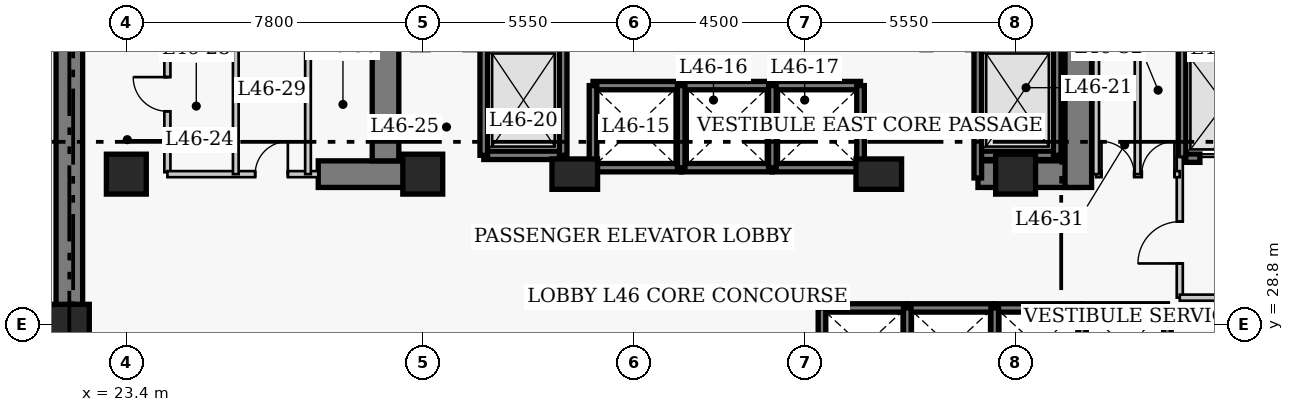
"""IFC4 building model, lengths in metres.
Left out: names, types, materials, properties, quantities, classifications, styles, units other than length and angle.
Written with IfcOpenShell. Run it as: python <this file> out.ifc"""

import sys

from ifc_helpers import new_model, si_unit, direction, frame, frame_2d, origin, origin_2d, place, context, subcontext, project, spatial, rectangle, extrude, element, fill, save


model = new_model("IFC4")
c1 = context("Model", 3, precision=1e-05, world=origin(), true_north=direction((0.0, 1.0)))
c2 = subcontext(c1, "Body", "Model", "MODEL_VIEW")
j1 = project(units=[si_unit("LENGTHUNIT", "METRE"), si_unit("PLANEANGLEUNIT", "RADIAN")], contexts=[c1])
p1 = place(None, origin())
s1 = spatial("IfcSite", under=j1, at=p1, CompositionType="ELEMENT")
p2 = place(p1, origin())
s2 = spatial("IfcBuilding", under=s1, at=p2, CompositionType="ELEMENT")
p3 = place(p2, frame((0.0, 0.0, 184.0)))
s3 = spatial("IfcBuildingStorey", under=s2, at=p3, CompositionType="ELEMENT", Elevation=184.0)
p4 = place(p3, frame((21.9, 27.05, 0.0), z_axis=(0.0, 0.0, 1.0), x_axis=(0.0, 1.0, 0.0)))
e1 = element("IfcWall", 1, at=p4, inside=s3, PredefinedType="SHEAR", context=c2, shape_type="SweptSolid", body=[
    extrude(rectangle(XDim=13.62, YDim=0.7, at=frame_2d((6.81, 0.0))), origin(), (0.0, 0.0, 1.0), 5.0),
])
p5 = place(p3, frame((28.45, 32.75, 0.0), z_axis=(0.0, 0.0, 1.0), x_axis=(1.0, 0.0, 0.0)))
e2 = element("IfcWall", 2, at=p5, inside=s3, PredefinedType="SHEAR", context=c2, shape_type="SweptSolid", body=[
    extrude(rectangle(XDim=2.4, YDim=0.7, at=frame_2d((1.2, 0.0))), origin(), (0.0, 0.0, 1.0), 5.0),
])
p6 = place(p3, frame((45.81, 32.75, 0.0), z_axis=(0.0, 0.0, 1.0), x_axis=(1.0, 0.0, 0.0)))
e3 = element("IfcWall", 3, at=p6, inside=s3, PredefinedType="SHEAR", context=c2, shape_type="SweptSolid", body=[
    extrude(rectangle(XDim=2.64, YDim=0.7, at=frame_2d((1.32, 0.0))), origin(), (0.0, 0.0, 1.0), 5.0),
])
p7 = place(p3, frame((30.22, 33.1, 0.0), z_axis=(0.0, 0.0, 1.0), x_axis=(0.0, 1.0, 0.0)))
e4 = element("IfcWall", 4, at=p7, inside=s3, PredefinedType="SHEAR", context=c2, shape_type="SweptSolid", body=[
    extrude(rectangle(XDim=7.22, YDim=0.7, at=frame_2d((3.61, 0.0))), origin(), (0.0, 0.0, 1.0), 5.0),
])
p8 = place(p3, frame((48.45, 32.4, 0.0), z_axis=(0.0, 0.0, 1.0), x_axis=(0.0, 1.0, 0.0)))
e5 = element("IfcWall", 5, at=p8, inside=s3, PredefinedType="SHEAR", context=c2, shape_type="SweptSolid", body=[
    extrude(rectangle(XDim=7.92, YDim=0.7, at=frame_2d((3.96, 0.0))), origin(), (0.0, 0.0, 1.0), 5.0),
])
p9 = place(p8, frame((5.8, 0.0, 0.0)))
e6 = element("IfcOpeningElement", 6, at=p9, cuts=e5, PredefinedType="OPENING", context=c2, shape_type="SweptSolid", body=[
    extrude(rectangle(XDim=1.1, YDim=2.15, at=frame_2d((0.55, 1.075))), frame((0.0, 0.36, 0.0), z_axis=(0.0, -1.0, 0.0), x_axis=(1.0, 0.0, 0.0)), (0.0, 0.0, 1.0), 0.72),
])
for number, where, z_axis, x_axis in (
    (7, (21.9, 28.8, 0.0), (0.0, 0.0, 1.0), (1.0, 0.0, 0.0)),
    (8, (23.4, 32.75, 0.0), (0.0, 0.0, 1.0), (1.0, 0.0, 0.0)),
    (9, (31.2, 32.75, 0.0), (0.0, 0.0, 1.0), (1.0, 0.0, 0.0)),
):
    element("IfcColumn", number, at=place(p3, frame(where, z_axis=z_axis, x_axis=x_axis)), inside=s3, PredefinedType="COLUMN", context=c2, shape_type="SweptSolid", body=[
        extrude(rectangle(XDim=1.05, YDim=1.05, at=origin_2d()), origin(), (0.0, 0.0, 1.0), 5.0),
    ])
for number, where, z_axis, x_axis in (
    (10, (35.2, 32.75, 0.0), (0.0, 0.0, 1.0), (1.0, 0.0, 0.0)),
    (11, (43.2, 32.75, 0.0), (0.0, 0.0, 1.0), (1.0, 0.0, 0.0)),
):
    element("IfcColumn", number, at=place(p3, frame(where, z_axis=z_axis, x_axis=x_axis)), inside=s3, PredefinedType="COLUMN", context=c2, shape_type="SweptSolid", body=[
        extrude(rectangle(XDim=1.2, YDim=0.8, at=origin_2d()), origin(), (0.0, 0.0, 1.0), 5.0),
    ])
p10 = place(p3, frame((46.8, 32.75, 0.0), z_axis=(0.0, 0.0, 1.0), x_axis=(1.0, 0.0, 0.0)))
e12 = element("IfcColumn", 12, at=p10, inside=s3, PredefinedType="COLUMN", context=c2, shape_type="SweptSolid", body=[
    extrude(rectangle(XDim=1.05, YDim=1.05, at=origin_2d()), origin(), (0.0, 0.0, 1.0), 5.0),
])
p11 = place(p3, frame((41.705, 29.23, 0.0), z_axis=(0.0, 0.0, 1.0), x_axis=(1.0, 0.0, 0.0)))
e13 = element("IfcWall", 13, at=p11, inside=s3, PredefinedType="SHEAR", context=c2, shape_type="SweptSolid", body=[
    extrude(rectangle(XDim=2.245, YDim=0.22, at=frame_2d((1.123, 0.0))), origin(), (0.0, 0.0, 1.0), 5.0),
])
p12 = place(p3, frame((41.705, 27.17, 0.0), z_axis=(0.0, 0.0, 1.0), x_axis=(0.0, 1.0, 0.0)))
e14 = element("IfcWall", 14, at=p12, inside=s3, PredefinedType="SHEAR", context=c2, shape_type="SweptSolid", body=[
    extrude(rectangle(XDim=2.06, YDim=0.2, at=frame_2d((1.03, 0.0))), origin(), (0.0, 0.0, 1.0), 5.0),
])
p13 = place(p3, frame((43.95, 29.23, 0.0), z_axis=(0.0, 0.0, 1.0), x_axis=(1.0, 0.0, 0.0)))
e15 = element("IfcWall", 15, at=p13, inside=s3, PredefinedType="SHEAR", context=c2, shape_type="SweptSolid", body=[
    extrude(rectangle(XDim=2.3, YDim=0.22, at=frame_2d((1.15, 0.0))), origin(), (0.0, 0.0, 1.0), 5.0),
])
p14 = place(p3, frame((43.95, 27.17, 0.0), z_axis=(0.0, 0.0, 1.0), x_axis=(0.0, 1.0, 0.0)))
e16 = element("IfcWall", 16, at=p14, inside=s3, PredefinedType="SHEAR", context=c2, shape_type="SweptSolid", body=[
    extrude(rectangle(XDim=2.06, YDim=0.2, at=frame_2d((1.03, 0.0))), origin(), (0.0, 0.0, 1.0), 5.0),
])
p15 = place(p3, frame((46.25, 29.23, 0.0), z_axis=(0.0, 0.0, 1.0), x_axis=(1.0, 0.0, 0.0)))
e17 = element("IfcWall", 17, at=p15, inside=s3, PredefinedType="SHEAR", context=c2, shape_type="SweptSolid", body=[
    extrude(rectangle(XDim=2.3, YDim=0.22, at=frame_2d((1.15, 0.0))), origin(), (0.0, 0.0, 1.0), 5.0),
])
p16 = place(p3, frame((46.25, 27.17, 0.0), z_axis=(0.0, 0.0, 1.0), x_axis=(0.0, 1.0, 0.0)))
e18 = element("IfcWall", 18, at=p16, inside=s3, PredefinedType="SHEAR", context=c2, shape_type="SweptSolid", body=[
    extrude(rectangle(XDim=2.06, YDim=0.2, at=frame_2d((1.03, 0.0))), origin(), (0.0, 0.0, 1.0), 5.0),
])
p17 = place(p3, frame((48.55, 29.23, 0.0), z_axis=(0.0, 0.0, 1.0), x_axis=(1.0, 0.0, 0.0)))
e19 = element("IfcWall", 19, at=p17, inside=s3, PredefinedType="SHEAR", context=c2, shape_type="SweptSolid", body=[
    extrude(rectangle(XDim=2.245, YDim=0.22, at=frame_2d((1.123, 0.0))), origin(), (0.0, 0.0, 1.0), 5.0),
])
for number, where, z_axis, x_axis in (
    (20, (48.55, 27.17, 0.0), (0.0, 0.0, 1.0), (0.0, 1.0, 0.0)),
    (21, (50.795, 27.17, 0.0), (0.0, 0.0, 1.0), (0.0, 1.0, 0.0)),
):
    element("IfcWall", number, at=place(p3, frame(where, z_axis=z_axis, x_axis=x_axis)), inside=s3, PredefinedType="SHEAR", context=c2, shape_type="SweptSolid", body=[
        extrude(rectangle(XDim=2.06, YDim=0.2, at=frame_2d((1.03, 0.0))), origin(), (0.0, 0.0, 1.0), 5.0),
    ])
for number, where, z_axis, x_axis in (
    (22, (35.68, 35.08, 0.0), (0.0, 0.0, 1.0), (1.0, 0.0, 0.0)),
    (23, (35.68, 32.92, 0.0), (0.0, 0.0, 1.0), (1.0, 0.0, 0.0)),
):
    element("IfcWall", number, at=place(p3, frame(where, z_axis=z_axis, x_axis=x_axis)), inside=s3, PredefinedType="SHEAR", context=c2, shape_type="SweptSolid", body=[
        extrude(rectangle(XDim=2.32, YDim=0.22, at=frame_2d((1.16, 0.0))), origin(), (0.0, 0.0, 1.0), 5.0),
    ])
p18 = place(p3, frame((35.68, 32.92, 0.0), z_axis=(0.0, 0.0, 1.0), x_axis=(0.0, 1.0, 0.0)))
e24 = element("IfcWall", 24, at=p18, inside=s3, PredefinedType="SHEAR", context=c2, shape_type="SweptSolid", body=[
    extrude(rectangle(XDim=2.16, YDim=0.2, at=frame_2d((1.08, 0.0))), origin(), (0.0, 0.0, 1.0), 5.0),
])
for number, where, z_axis, x_axis in (
    (25, (38.0, 35.08, 0.0), (0.0, 0.0, 1.0), (1.0, 0.0, 0.0)),
    (26, (38.0, 32.92, 0.0), (0.0, 0.0, 1.0), (1.0, 0.0, 0.0)),
):
    element("IfcWall", number, at=place(p3, frame(where, z_axis=z_axis, x_axis=x_axis)), inside=s3, PredefinedType="SHEAR", context=c2, shape_type="SweptSolid", body=[
        extrude(rectangle(XDim=2.4, YDim=0.22, at=frame_2d((1.2, 0.0))), origin(), (0.0, 0.0, 1.0), 5.0),
    ])
p19 = place(p3, frame((38.0, 32.92, 0.0), z_axis=(0.0, 0.0, 1.0), x_axis=(0.0, 1.0, 0.0)))
e27 = element("IfcWall", 27, at=p19, inside=s3, PredefinedType="SHEAR", context=c2, shape_type="SweptSolid", body=[
    extrude(rectangle(XDim=2.16, YDim=0.2, at=frame_2d((1.08, 0.0))), origin(), (0.0, 0.0, 1.0), 5.0),
])
for number, where, z_axis, x_axis in (
    (28, (40.4, 35.08, 0.0), (0.0, 0.0, 1.0), (1.0, 0.0, 0.0)),
    (29, (40.4, 32.92, 0.0), (0.0, 0.0, 1.0), (1.0, 0.0, 0.0)),
):
    element("IfcWall", number, at=place(p3, frame(where, z_axis=z_axis, x_axis=x_axis)), inside=s3, PredefinedType="SHEAR", context=c2, shape_type="SweptSolid", body=[
        extrude(rectangle(XDim=2.32, YDim=0.22, at=frame_2d((1.16, 0.0))), origin(), (0.0, 0.0, 1.0), 5.0),
    ])
for number, where, z_axis, x_axis in (
    (30, (40.4, 32.92, 0.0), (0.0, 0.0, 1.0), (0.0, 1.0, 0.0)),
    (31, (42.72, 32.92, 0.0), (0.0, 0.0, 1.0), (0.0, 1.0, 0.0)),
):
    element("IfcWall", number, at=place(p3, frame(where, z_axis=z_axis, x_axis=x_axis)), inside=s3, PredefinedType="SHEAR", context=c2, shape_type="SweptSolid", body=[
        extrude(rectangle(XDim=2.16, YDim=0.2, at=frame_2d((1.08, 0.0))), origin(), (0.0, 0.0, 1.0), 5.0),
    ])
p20 = place(p3, frame((51.18, 36.03, 0.0), z_axis=(0.0, 0.0, 1.0), x_axis=(1.0, 0.0, 0.0)))
e32 = element("IfcWall", 32, at=p20, inside=s3, PredefinedType="SHEAR", context=c2, shape_type="SweptSolid", body=[
    extrude(rectangle(XDim=2.42, YDim=0.22, at=frame_2d((1.21, 0.0))), origin(), (0.0, 0.0, 1.0), 5.0),
])
p21 = place(p3, frame((51.18, 33.17, 0.0), z_axis=(0.0, 0.0, 1.0), x_axis=(1.0, 0.0, 0.0)))
e33 = element("IfcWall", 33, at=p21, inside=s3, PredefinedType="SHEAR", context=c2, shape_type="SweptSolid", body=[
    extrude(rectangle(XDim=2.42, YDim=0.22, at=frame_2d((1.21, 0.0))), origin(), (0.0, 0.0, 1.0), 5.0),
])
p22 = place(p21, frame((0.47, 0.0, 0.0)))
e34 = element("IfcOpeningElement", 34, at=p22, cuts=e33, PredefinedType="OPENING", context=c2, shape_type="SweptSolid", body=[
    extrude(rectangle(XDim=1.3, YDim=2.15, at=frame_2d((0.65, 1.075))), frame((0.0, 0.12, 0.0), z_axis=(0.0, -1.0, 0.0), x_axis=(1.0, 0.0, 0.0)), (0.0, 0.0, 1.0), 0.24),
])
p23 = place(p3, frame((51.18, 33.17, 0.0), z_axis=(0.0, 0.0, 1.0), x_axis=(0.0, 1.0, 0.0)))
e35 = element("IfcWall", 35, at=p23, inside=s3, PredefinedType="SHEAR", context=c2, shape_type="SweptSolid", body=[
    extrude(rectangle(XDim=2.86, YDim=0.2, at=frame_2d((1.43, 0.0))), origin(), (0.0, 0.0, 1.0), 5.0),
])
p24 = place(p3, frame((32.805, 33.245, 0.0), z_axis=(0.0, 0.0, 1.0), x_axis=(1.0, 0.0, 0.0)))
e36 = element("IfcWall", 36, at=p24, inside=s3, PredefinedType="SHEAR", context=c2, shape_type="SweptSolid", body=[
    extrude(rectangle(XDim=2.09, YDim=0.22, at=frame_2d((1.045, 0.0))), origin(), (0.0, 0.0, 1.0), 5.0),
])
for number, where, z_axis, x_axis in (
    (37, (32.805, 33.245, 0.0), (0.0, 0.0, 1.0), (0.0, 1.0, 0.0)),
    (38, (34.895, 33.245, 0.0), (0.0, 0.0, 1.0), (0.0, 1.0, 0.0)),
):
    element("IfcWall", number, at=place(p3, frame(where, z_axis=z_axis, x_axis=x_axis)), inside=s3, PredefinedType="SHEAR", context=c2, shape_type="SweptSolid", body=[
        extrude(rectangle(XDim=2.91, YDim=0.2, at=frame_2d((1.455, 0.0))), origin(), (0.0, 0.0, 1.0), 5.0),
    ])
p25 = place(p3, frame((45.805, 33.245, 0.0), z_axis=(0.0, 0.0, 1.0), x_axis=(1.0, 0.0, 0.0)))
e39 = element("IfcWall", 39, at=p25, inside=s3, PredefinedType="SHEAR", context=c2, shape_type="SweptSolid", body=[
    extrude(rectangle(XDim=2.09, YDim=0.22, at=frame_2d((1.045, 0.0))), origin(), (0.0, 0.0, 1.0), 5.0),
])
p26 = place(p3, frame((45.805, 32.65, 0.0), z_axis=(0.0, 0.0, 1.0), x_axis=(0.0, 1.0, 0.0)))
e40 = element("IfcWall", 40, at=p26, inside=s3, PredefinedType="SHEAR", context=c2, shape_type="SweptSolid", body=[
    extrude(rectangle(XDim=3.505, YDim=0.2, at=frame_2d((1.752, 0.0))), origin(), (0.0, 0.0, 1.0), 5.0),
])
p27 = place(p3, frame((47.895, 33.245, 0.0), z_axis=(0.0, 0.0, 1.0), x_axis=(0.0, 1.0, 0.0)))
e41 = element("IfcWall", 41, at=p27, inside=s3, PredefinedType="SHEAR", context=c2, shape_type="SweptSolid", body=[
    extrude(rectangle(XDim=2.91, YDim=0.2, at=frame_2d((1.455, 0.0))), origin(), (0.0, 0.0, 1.0), 5.0),
])
p28 = place(p3, frame((24.48, 32.8, 0.0), z_axis=(0.0, 0.0, 1.0), x_axis=(0.0, 1.0, 0.0)))
e42 = element("IfcWall", 42, at=p28, inside=s3, PredefinedType="PARTITIONING", context=c2, shape_type="SweptSolid", body=[
    extrude(rectangle(XDim=3.57, YDim=0.16, at=frame_2d((1.785, 0.0))), origin(), (0.0, 0.0, 1.0), 4.75),
])
p29 = place(p28, frame((1.604, 0.0, 0.0)))
e43 = element("IfcOpeningElement", 43, at=p29, cuts=e42, PredefinedType="OPENING", context=c2, shape_type="SweptSolid", body=[
    extrude(rectangle(XDim=0.9, YDim=2.1, at=frame_2d((0.45, 1.05))), frame((0.0, 0.09, 0.0), z_axis=(0.0, -1.0, 0.0), x_axis=(1.0, 0.0, 0.0)), (0.0, 0.0, 1.0), 0.18),
])
p30 = place(p3, frame((51.12, 29.5, 0.0), z_axis=(0.0, 0.0, 1.0), x_axis=(0.0, 1.0, 0.0)))
e44 = element("IfcWall", 44, at=p30, inside=s3, PredefinedType="PARTITIONING", context=c2, shape_type="SweptSolid", body=[
    extrude(rectangle(XDim=3.7, YDim=0.16, at=frame_2d((1.85, 0.0))), origin(), (0.0, 0.0, 1.0), 4.75),
])
p31 = place(p30, frame((0.9, 0.0, 0.0)))
e45 = element("IfcOpeningElement", 45, at=p31, cuts=e44, PredefinedType="OPENING", context=c2, shape_type="SweptSolid", body=[
    extrude(rectangle(XDim=1.1, YDim=2.15, at=frame_2d((0.55, 1.075))), frame((0.0, 0.09, 0.0), z_axis=(0.0, -1.0, 0.0), x_axis=(1.0, 0.0, 0.0)), (0.0, 0.0, 1.0), 0.18),
])
p32 = place(p3, frame((51.12, 29.5, 0.0), z_axis=(0.0, 0.0, 1.0), x_axis=(1.0, 0.0, 0.0)))
e46 = element("IfcWall", 46, at=p32, inside=s3, PredefinedType="PARTITIONING", context=c2, shape_type="SweptSolid", body=[
    extrude(rectangle(XDim=5.63, YDim=0.16, at=frame_2d((2.815, 0.0))), origin(), (0.0, 0.0, 1.0), 4.75),
])
p33 = place(p3, frame((24.48, 32.75, 0.0), z_axis=(0.0, 0.0, 1.0), x_axis=(1.0, 0.0, 0.0)))
e47 = element("IfcWall", 47, at=p33, inside=s3, PredefinedType="PARTITIONING", context=c2, shape_type="SweptSolid", body=[
    extrude(rectangle(XDim=3.97, YDim=0.16, at=frame_2d((1.985, 0.0))), origin(), (0.0, 0.0, 1.0), 4.75),
])
p34 = place(p33, frame((2.31, 0.0, 0.0)))
e48 = element("IfcOpeningElement", 48, at=p34, cuts=e47, PredefinedType="OPENING", context=c2, shape_type="SweptSolid", body=[
    extrude(rectangle(XDim=0.86, YDim=2.05, at=frame_2d((0.43, 1.025))), frame((0.0, 0.09, 0.0), z_axis=(0.0, -1.0, 0.0), x_axis=(1.0, 0.0, 0.0)), (0.0, 0.0, 1.0), 0.18),
])
p35 = place(p3, frame((48.92, 32.75, 0.0), z_axis=(0.0, 0.0, 1.0), x_axis=(1.0, 0.0, 0.0)))
e49 = element("IfcWall", 49, at=p35, inside=s3, PredefinedType="PARTITIONING", context=c2, shape_type="SweptSolid", body=[
    extrude(rectangle(XDim=2.2, YDim=0.16, at=frame_2d((1.1, 0.0))), origin(), (0.0, 0.0, 1.0), 4.75),
])
p36 = place(p35, frame((0.14, 0.0, 0.0)))
e50 = element("IfcOpeningElement", 50, at=p36, cuts=e49, PredefinedType="OPENING", context=c2, shape_type="SweptSolid", body=[
    extrude(rectangle(XDim=0.86, YDim=2.05, at=frame_2d((0.43, 1.025))), frame((0.0, 0.09, 0.0), z_axis=(0.0, -1.0, 0.0), x_axis=(1.0, 0.0, 0.0)), (0.0, 0.0, 1.0), 0.18),
])
p37 = place(p35, frame((1.2, 0.0, 0.0)))
e51 = element("IfcOpeningElement", 51, at=p37, cuts=e49, PredefinedType="OPENING", context=c2, shape_type="SweptSolid", body=[
    extrude(rectangle(XDim=0.86, YDim=2.05, at=frame_2d((0.43, 1.025))), frame((0.0, 0.09, 0.0), z_axis=(0.0, -1.0, 0.0), x_axis=(1.0, 0.0, 0.0)), (0.0, 0.0, 1.0), 0.18),
])
for number, where, z_axis, x_axis in (
    (52, (48.92, 32.75, 0.0), (0.0, 0.0, 1.0), (0.0, 1.0, 0.0)),
    (53, (26.28, 32.75, 0.0), (0.0, 0.0, 1.0), (0.0, 1.0, 0.0)),
    (54, (28.18, 32.75, 0.0), (0.0, 0.0, 1.0), (0.0, 1.0, 0.0)),
    (55, (50.01, 32.75, 0.0), (0.0, 0.0, 1.0), (0.0, 1.0, 0.0)),
):
    element("IfcWall", number, at=place(p3, frame(where, z_axis=z_axis, x_axis=x_axis)), inside=s3, PredefinedType="PARTITIONING", context=c2, shape_type="SweptSolid", body=[
        extrude(rectangle(XDim=3.62, YDim=0.15, at=frame_2d((1.81, 0.0))), origin(), (0.0, 0.0, 1.0), 4.75),
    ])
p38 = place(p22, origin())
e56 = element("IfcDoor", 56, at=p38, inside=s3, OperationType="DOUBLE_DOOR_SLIDING", PredefinedType="DOOR", context=c2, shape_type="SweptSolid", body=[
    extrude(rectangle(XDim=1.3, YDim=2.15, at=frame_2d((0.65, 1.075))), frame((0.0, 0.025, 0.0), z_axis=(0.0, -1.0, 0.0), x_axis=(1.0, 0.0, 0.0)), (0.0, 0.0, 1.0), 0.05),
])
fill(e34, e56)
p39 = place(p31, origin())
e57 = element("IfcDoor", 57, at=p39, inside=s3, OperationType="SINGLE_SWING_LEFT", PredefinedType="DOOR", context=c2, shape_type="SweptSolid", body=[
    extrude(rectangle(XDim=1.1, YDim=2.15, at=frame_2d((0.55, 1.075))), frame((0.0, 0.025, 0.0), z_axis=(0.0, -1.0, 0.0), x_axis=(1.0, 0.0, 0.0)), (0.0, 0.0, 1.0), 0.05),
])
fill(e45, e57)
p40 = place(p29, origin())
e58 = element("IfcDoor", 58, at=p40, inside=s3, OperationType="SINGLE_SWING_RIGHT", PredefinedType="DOOR", context=c2, shape_type="SweptSolid", body=[
    extrude(rectangle(XDim=0.9, YDim=2.1, at=frame_2d((0.45, 1.05))), frame((0.0, 0.025, 0.0), z_axis=(0.0, -1.0, 0.0), x_axis=(1.0, 0.0, 0.0)), (0.0, 0.0, 1.0), 0.05),
])
fill(e43, e58)
p41 = place(p34, origin())
e59 = element("IfcDoor", 59, at=p41, inside=s3, OperationType="SINGLE_SWING_RIGHT", PredefinedType="DOOR", context=c2, shape_type="SweptSolid", body=[
    extrude(rectangle(XDim=0.86, YDim=2.05, at=frame_2d((0.43, 1.025))), frame((0.0, 0.025, 0.0), z_axis=(0.0, -1.0, 0.0), x_axis=(1.0, 0.0, 0.0)), (0.0, 0.0, 1.0), 0.05),
])
fill(e48, e59)
p42 = place(p36, origin())
e60 = element("IfcDoor", 60, at=p42, inside=s3, OperationType="SINGLE_SWING_LEFT", PredefinedType="DOOR", context=c2, shape_type="SweptSolid", body=[
    extrude(rectangle(XDim=0.86, YDim=2.05, at=frame_2d((0.43, 1.025))), frame((0.0, 0.025, 0.0), z_axis=(0.0, -1.0, 0.0), x_axis=(1.0, 0.0, 0.0)), (0.0, 0.0, 1.0), 0.05),
])
fill(e50, e60)
p43 = place(p37, origin())
e61 = element("IfcDoor", 61, at=p43, inside=s3, OperationType="SINGLE_SWING_RIGHT", PredefinedType="DOOR", context=c2, shape_type="SweptSolid", body=[
    extrude(rectangle(XDim=0.86, YDim=2.05, at=frame_2d((0.43, 1.025))), frame((0.0, 0.025, 0.0), z_axis=(0.0, -1.0, 0.0), x_axis=(1.0, 0.0, 0.0)), (0.0, 0.0, 1.0), 0.05),
])
fill(e51, e61)
save(model, sys.argv[1])
